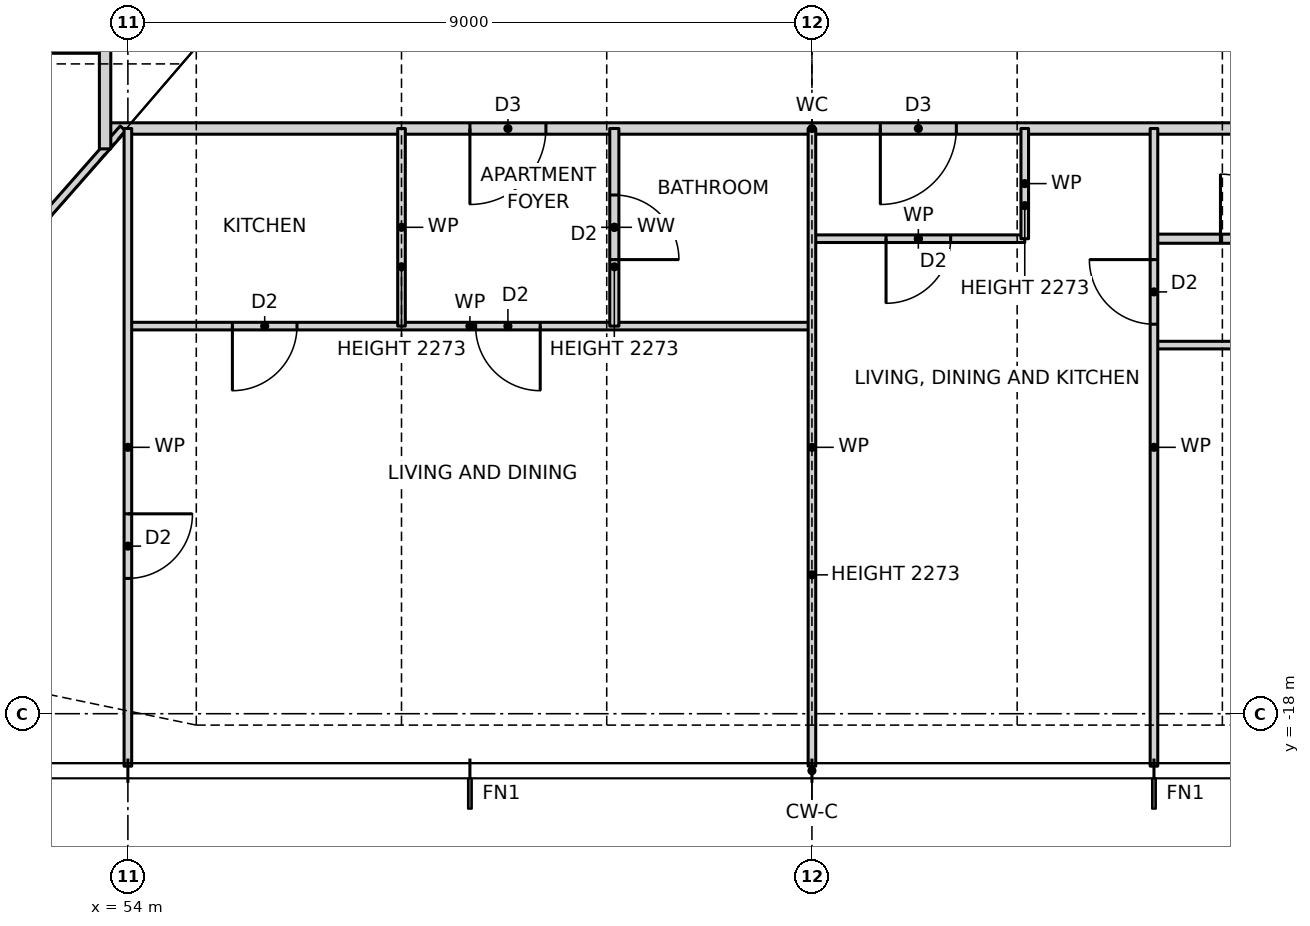
"""IFC4 building model, lengths in metres.
Left out: names, types, materials, properties, quantities, classifications, styles, units other than length and angle.
Written with IfcOpenShell. Run it as: python <this file> out.ifc"""

import sys

from ifc_helpers import new_model, si_unit, direction, frame, frame_2d, origin, place, context, subcontext, project, spatial, rectangle, extrude, element, fill, save


model = new_model("IFC4")
c1 = context("Model", 3, precision=1e-05, world=origin(), true_north=direction((0.0, 1.0)))
c2 = subcontext(c1, "Body", "Model", "MODEL_VIEW")
j1 = project(units=[si_unit("LENGTHUNIT", "METRE"), si_unit("PLANEANGLEUNIT", "RADIAN")], contexts=[c1])
p1 = place(None, origin())
s1 = spatial("IfcSite", under=j1, at=p1, CompositionType="ELEMENT")
p2 = place(p1, origin())
s2 = spatial("IfcBuilding", under=s1, at=p2, CompositionType="ELEMENT")
p3 = place(p2, frame((0.0, 0.0, 71.0)))
s3 = spatial("IfcBuildingStorey", under=s2, at=p3, CompositionType="ELEMENT", Elevation=71.0)
p4 = place(p3, frame((67.5, -13.15, 0.0), z_axis=(0.0, 0.0, 1.0), x_axis=(1.0, 0.0, 0.0)))
e1 = element("IfcWall", 1, at=p4, inside=s3, PredefinedType="PARTITIONING", context=c2, shape_type="SweptSolid", body=[
    extrude(rectangle(XDim=6.7, YDim=0.1, at=frame_2d((3.35, 0.0))), origin(), (0.0, 0.0, 1.0), 3.2),
])
p5 = place(p4, frame((1.825, 0.0, 0.0)))
e2 = element("IfcOpeningElement", 2, at=p5, cuts=e1, PredefinedType="OPENING", context=c2, shape_type="SweptSolid", body=[
    extrude(rectangle(XDim=0.85, YDim=2.1, at=frame_2d((0.425, 1.05))), frame((0.0, 0.06, 0.0), z_axis=(0.0, -1.0, 0.0), x_axis=(1.0, 0.0, 0.0)), (0.0, 0.0, 1.0), 0.12),
])
p6 = place(p4, frame((5.175, 0.0, 0.0)))
e3 = element("IfcOpeningElement", 3, at=p6, cuts=e1, PredefinedType="OPENING", context=c2, shape_type="SweptSolid", body=[
    extrude(rectangle(XDim=0.85, YDim=2.1, at=frame_2d((0.425, 1.05))), frame((0.0, 0.06, 0.0), z_axis=(0.0, -1.0, 0.0), x_axis=(1.0, 0.0, 0.0)), (0.0, 0.0, 1.0), 0.12),
])
p7 = place(p3, frame((54.0, -12.9, 0.0), z_axis=(0.0, 0.0, 1.0), x_axis=(1.0, 0.0, 0.0)))
e4 = element("IfcWall", 4, at=p7, inside=s3, PredefinedType="PARTITIONING", context=c2, shape_type="SweptSolid", body=[
    extrude(rectangle(XDim=9.0, YDim=0.1, at=frame_2d((4.5, 0.0))), origin(), (0.0, 0.0, 1.0), 3.2),
])
p8 = place(p7, frame((1.375, 0.0, 0.0)))
e5 = element("IfcOpeningElement", 5, at=p8, cuts=e4, PredefinedType="OPENING", context=c2, shape_type="SweptSolid", body=[
    extrude(rectangle(XDim=0.85, YDim=2.1, at=frame_2d((0.425, 1.05))), frame((0.0, 0.06, 0.0), z_axis=(0.0, -1.0, 0.0), x_axis=(1.0, 0.0, 0.0)), (0.0, 0.0, 1.0), 0.12),
])
p9 = place(p7, frame((4.575, 0.0, 0.0)))
e6 = element("IfcOpeningElement", 6, at=p9, cuts=e4, PredefinedType="OPENING", context=c2, shape_type="SweptSolid", body=[
    extrude(rectangle(XDim=0.85, YDim=2.1, at=frame_2d((0.425, 1.05))), frame((0.0, 0.06, 0.0), z_axis=(0.0, -1.0, 0.0), x_axis=(1.0, 0.0, 0.0)), (0.0, 0.0, 1.0), 0.12),
])
p10 = place(p3, frame((63.0, -11.75, 0.0), z_axis=(0.0, 0.0, 1.0), x_axis=(1.0, 0.0, 0.0)))
e7 = element("IfcWall", 7, at=p10, inside=s3, PredefinedType="PARTITIONING", context=c2, shape_type="SweptSolid", body=[
    extrude(rectangle(XDim=2.8, YDim=0.1, at=frame_2d((1.4, 0.0))), origin(), (0.0, 0.0, 1.0), 3.2),
])
p11 = place(p10, frame((0.975, 0.0, 0.0)))
e8 = element("IfcOpeningElement", 8, at=p11, cuts=e7, PredefinedType="OPENING", context=c2, shape_type="SweptSolid", body=[
    extrude(rectangle(XDim=0.85, YDim=2.1, at=frame_2d((0.425, 1.05))), frame((0.0, 0.06, 0.0), z_axis=(0.0, -1.0, 0.0), x_axis=(1.0, 0.0, 0.0)), (0.0, 0.0, 1.0), 0.12),
])
p12 = place(p3, frame((67.5, -11.75, 0.0), z_axis=(0.0, 0.0, 1.0), x_axis=(1.0, 0.0, 0.0)))
e9 = element("IfcWall", 9, at=p12, inside=s3, PredefinedType="PARTITIONING", context=c2, shape_type="SweptSolid", body=[
    extrude(rectangle(XDim=5.84, YDim=0.12, at=frame_2d((2.92, 0.0))), origin(), (0.0, 0.0, 1.0), 3.2),
])
p13 = place(p12, frame((0.875, 0.0, 0.0)))
e10 = element("IfcOpeningElement", 10, at=p13, cuts=e9, PredefinedType="OPENING", context=c2, shape_type="SweptSolid", body=[
    extrude(rectangle(XDim=0.85, YDim=2.1, at=frame_2d((0.425, 1.05))), frame((0.0, 0.07, 0.0), z_axis=(0.0, -1.0, 0.0), x_axis=(1.0, 0.0, 0.0)), (0.0, 0.0, 1.0), 0.14),
])
p14 = place(p12, frame((3.795, 0.0, 0.0)))
e11 = element("IfcOpeningElement", 11, at=p14, cuts=e9, PredefinedType="OPENING", context=c2, shape_type="SweptSolid", body=[
    extrude(rectangle(XDim=0.85, YDim=2.1, at=frame_2d((0.425, 1.05))), frame((0.0, 0.07, 0.0), z_axis=(0.0, -1.0, 0.0), x_axis=(1.0, 0.0, 0.0)), (0.0, 0.0, 1.0), 0.14),
])
p15 = place(p3, frame((53.7, -10.3, 0.0), z_axis=(0.0, 0.0, 1.0), x_axis=(1.0, 0.0, 0.0)))
e12 = element("IfcWall", 12, at=p15, inside=s3, PredefinedType="PARTITIONING", context=c2, shape_type="SweptSolid", body=[
    extrude(rectangle(XDim=18.6, YDim=0.15, at=frame_2d((9.3, 0.0))), origin(), (0.0, 0.0, 1.0), 3.2),
])
p16 = place(p15, frame((4.8, 0.0, 0.0)))
e13 = element("IfcOpeningElement", 13, at=p16, cuts=e12, PredefinedType="OPENING", context=c2, shape_type="SweptSolid", body=[
    extrude(rectangle(XDim=1.0, YDim=2.1, at=frame_2d((0.5, 1.05))), frame((0.0, 0.085, 0.0), z_axis=(0.0, -1.0, 0.0), x_axis=(1.0, 0.0, 0.0)), (0.0, 0.0, 1.0), 0.17),
])
p17 = place(p15, frame((10.2, 0.0, 0.0)))
e14 = element("IfcOpeningElement", 14, at=p17, cuts=e12, PredefinedType="OPENING", context=c2, shape_type="SweptSolid", body=[
    extrude(rectangle(XDim=1.0, YDim=2.1, at=frame_2d((0.5, 1.05))), frame((0.0, 0.085, 0.0), z_axis=(0.0, -1.0, 0.0), x_axis=(1.0, 0.0, 0.0)), (0.0, 0.0, 1.0), 0.17),
])
p18 = place(p3, frame((51.9, -9.25, 0.0), z_axis=(0.0, 0.0, 1.0), x_axis=(1.0, 0.0, 0.0)))
e15 = element("IfcWall", 15, at=p18, inside=s3, PredefinedType="PARTITIONING", context=c2, shape_type="SweptSolid", body=[
    extrude(rectangle(XDim=1.8, YDim=0.12, at=frame_2d((0.9, 0.0))), origin(), (0.0, 0.0, 1.0), 3.2),
])
p19 = place(p3, frame((47.944, -17.109, 0.0), z_axis=(0.0, 0.0, 1.0), x_axis=(0.660638210404, 0.750704439146, 0.0)))
e16 = element("IfcWall", 16, at=p19, inside=s3, PredefinedType="PARTITIONING", context=c2, shape_type="SweptSolid", body=[
    extrude(rectangle(XDim=9.07, YDim=0.1, at=frame_2d((4.535, 0.0))), origin(), (0.0, 0.0, 1.0), 2.273),
])
p20 = place(p3, frame((67.5, -18.69, 0.0), z_axis=(0.0, 0.0, 1.0), x_axis=(0.0, 1.0, 0.0)))
e17 = element("IfcWall", 17, at=p20, inside=s3, PredefinedType="PARTITIONING", context=c2, shape_type="SweptSolid", body=[
    extrude(rectangle(XDim=8.39, YDim=0.1, at=frame_2d((4.195, 0.0))), origin(), (0.0, 0.0, 1.0), 3.2),
])
p21 = place(p20, frame((5.815, 0.0, 0.0)))
e18 = element("IfcOpeningElement", 18, at=p21, cuts=e17, PredefinedType="OPENING", context=c2, shape_type="SweptSolid", body=[
    extrude(rectangle(XDim=0.85, YDim=2.1, at=frame_2d((0.425, 1.05))), frame((0.0, 0.06, 0.0), z_axis=(0.0, -1.0, 0.0), x_axis=(1.0, 0.0, 0.0)), (0.0, 0.0, 1.0), 0.12),
])
p22 = place(p3, frame((65.8, -11.75, 0.0), z_axis=(0.0, 0.0, 1.0), x_axis=(0.0, 1.0, 0.0)))
e19 = element("IfcWall", 19, at=p22, inside=s3, PredefinedType="PARTITIONING", context=c2, shape_type="SweptSolid", body=[
    extrude(rectangle(XDim=1.45, YDim=0.1, at=frame_2d((0.725, 0.0))), origin(), (0.0, 0.0, 1.0), 2.273),
])
p23 = place(p3, frame((63.0, -18.69, 0.0), z_axis=(0.0, 0.0, 1.0), x_axis=(0.0, 1.0, 0.0)))
e20 = element("IfcWall", 20, at=p23, inside=s3, PredefinedType="PARTITIONING", context=c2, shape_type="SweptSolid", body=[
    extrude(rectangle(XDim=8.39, YDim=0.1, at=frame_2d((4.195, 0.0))), origin(), (0.0, 0.0, 1.0), 2.273),
])
p24 = place(p3, frame((60.4, -12.9, 0.0), z_axis=(0.0, 0.0, 1.0), x_axis=(0.0, 1.0, 0.0)))
e21 = element("IfcWall", 21, at=p24, inside=s3, PredefinedType="PARTITIONING", context=c2, shape_type="SweptSolid", body=[
    extrude(rectangle(XDim=2.6, YDim=0.12, at=frame_2d((1.3, 0.0))), origin(), (0.0, 0.0, 1.0), 2.273),
])
p25 = place(p24, frame((0.875, 0.0, 0.0)))
e22 = element("IfcOpeningElement", 22, at=p25, cuts=e21, PredefinedType="OPENING", context=c2, shape_type="SweptSolid", body=[
    extrude(rectangle(XDim=0.85, YDim=2.1, at=frame_2d((0.425, 1.05))), frame((0.0, 0.07, 0.0), z_axis=(0.0, -1.0, 0.0), x_axis=(1.0, 0.0, 0.0)), (0.0, 0.0, 1.0), 0.14),
])
p26 = place(p3, frame((57.6, -12.9, 0.0), z_axis=(0.0, 0.0, 1.0), x_axis=(0.0, 1.0, 0.0)))
e23 = element("IfcWall", 23, at=p26, inside=s3, PredefinedType="PARTITIONING", context=c2, shape_type="SweptSolid", body=[
    extrude(rectangle(XDim=2.6, YDim=0.1, at=frame_2d((1.3, 0.0))), origin(), (0.0, 0.0, 1.0), 2.273),
])
p27 = place(p3, frame((54.0, -18.69, 0.0), z_axis=(0.0, 0.0, 1.0), x_axis=(0.0, 1.0, 0.0)))
e24 = element("IfcWall", 24, at=p27, inside=s3, PredefinedType="PARTITIONING", context=c2, shape_type="SweptSolid", body=[
    extrude(rectangle(XDim=8.39, YDim=0.1, at=frame_2d((4.195, 0.0))), origin(), (0.0, 0.0, 1.0), 3.2),
])
p28 = place(p27, frame((2.47, 0.0, 0.0)))
e25 = element("IfcOpeningElement", 25, at=p28, cuts=e24, PredefinedType="OPENING", context=c2, shape_type="SweptSolid", body=[
    extrude(rectangle(XDim=0.85, YDim=2.1, at=frame_2d((0.425, 1.05))), frame((0.0, 0.06, 0.0), z_axis=(0.0, -1.0, 0.0), x_axis=(1.0, 0.0, 0.0)), (0.0, 0.0, 1.0), 0.12),
])
p29 = place(p3, frame((53.7, -10.568, 0.0), z_axis=(0.0, 0.0, 1.0), x_axis=(0.0, 1.0, 0.0)))
e26 = element("IfcWall", 26, at=p29, inside=s3, PredefinedType="PARTITIONING", context=c2, shape_type="SweptSolid", body=[
    extrude(rectangle(XDim=21.136, YDim=0.15, at=frame_2d((10.568, 0.0))), origin(), (0.0, 0.0, 1.0), 3.2),
])
p30 = place(p29, frame((16.318, 0.0, 0.0)))
e27 = element("IfcOpeningElement", 27, at=p30, cuts=e26, PredefinedType="OPENING", context=c2, shape_type="SweptSolid", body=[
    extrude(rectangle(XDim=1.0, YDim=2.1, at=frame_2d((0.5, 1.05))), frame((0.0, 0.085, 0.0), z_axis=(0.0, -1.0, 0.0), x_axis=(1.0, 0.0, 0.0)), (0.0, 0.0, 1.0), 0.17),
])
p31 = place(p29, frame((10.918, 0.0, 0.0)))
e28 = element("IfcOpeningElement", 28, at=p31, cuts=e26, PredefinedType="OPENING", context=c2, shape_type="SweptSolid", body=[
    extrude(rectangle(XDim=1.0, YDim=2.1, at=frame_2d((0.5, 1.05))), frame((0.0, 0.085, 0.0), z_axis=(0.0, -1.0, 0.0), x_axis=(1.0, 0.0, 0.0)), (0.0, 0.0, 1.0), 0.17),
])
p32 = place(p8, frame((0.85, 0.0, 0.0), z_axis=(0.0, 0.0, 1.0), x_axis=(-1.0, 0.0, 0.0)))
e29 = element("IfcDoor", 29, at=p32, inside=s3, OperationType="SINGLE_SWING_RIGHT", PredefinedType="DOOR", context=c2, shape_type="SweptSolid", body=[
    extrude(rectangle(XDim=0.85, YDim=2.1, at=frame_2d((0.425, 1.05))), frame((0.0, 0.025, 0.0), z_axis=(0.0, -1.0, 0.0), x_axis=(1.0, 0.0, 0.0)), (0.0, 0.0, 1.0), 0.05),
])
fill(e5, e29)
p33 = place(p16, frame((1.0, 0.0, 0.0), z_axis=(0.0, 0.0, 1.0), x_axis=(-1.0, 0.0, 0.0)))
e30 = element("IfcDoor", 30, at=p33, inside=s3, OperationType="SINGLE_SWING_RIGHT", PredefinedType="DOOR", context=c2, shape_type="SweptSolid", body=[
    extrude(rectangle(XDim=1.0, YDim=2.1, at=frame_2d((0.5, 1.05))), frame((0.0, 0.025, 0.0), z_axis=(0.0, -1.0, 0.0), x_axis=(1.0, 0.0, 0.0)), (0.0, 0.0, 1.0), 0.05),
])
fill(e13, e30)
p34 = place(p9, frame((0.85, 0.0, 0.0), z_axis=(0.0, 0.0, 1.0), x_axis=(-1.0, 0.0, 0.0)))
e31 = element("IfcDoor", 31, at=p34, inside=s3, OperationType="SINGLE_SWING_LEFT", PredefinedType="DOOR", context=c2, shape_type="SweptSolid", body=[
    extrude(rectangle(XDim=0.85, YDim=2.1, at=frame_2d((0.425, 1.05))), frame((0.0, 0.025, 0.0), z_axis=(0.0, -1.0, 0.0), x_axis=(1.0, 0.0, 0.0)), (0.0, 0.0, 1.0), 0.05),
])
fill(e6, e31)
p35 = place(p25, frame((0.85, 0.0, 0.0), z_axis=(0.0, 0.0, 1.0), x_axis=(-1.0, 0.0, 0.0)))
e32 = element("IfcDoor", 32, at=p35, inside=s3, OperationType="SINGLE_SWING_RIGHT", PredefinedType="DOOR", context=c2, shape_type="SweptSolid", body=[
    extrude(rectangle(XDim=0.85, YDim=2.1, at=frame_2d((0.425, 1.05))), frame((0.0, 0.025, 0.0), z_axis=(0.0, -1.0, 0.0), x_axis=(1.0, 0.0, 0.0)), (0.0, 0.0, 1.0), 0.05),
])
fill(e22, e32)
p36 = place(p28, frame((0.85, 0.0, 0.0), z_axis=(0.0, 0.0, 1.0), x_axis=(-1.0, 0.0, 0.0)))
e33 = element("IfcDoor", 33, at=p36, inside=s3, OperationType="SINGLE_SWING_LEFT", PredefinedType="DOOR", context=c2, shape_type="SweptSolid", body=[
    extrude(rectangle(XDim=0.85, YDim=2.1, at=frame_2d((0.425, 1.05))), frame((0.0, 0.025, 0.0), z_axis=(0.0, -1.0, 0.0), x_axis=(1.0, 0.0, 0.0)), (0.0, 0.0, 1.0), 0.05),
])
fill(e25, e33)
p37 = place(p17, frame((1.0, 0.0, 0.0), z_axis=(0.0, 0.0, 1.0), x_axis=(-1.0, 0.0, 0.0)))
e34 = element("IfcDoor", 34, at=p37, inside=s3, OperationType="SINGLE_SWING_RIGHT", PredefinedType="DOOR", context=c2, shape_type="SweptSolid", body=[
    extrude(rectangle(XDim=1.0, YDim=2.1, at=frame_2d((0.5, 1.05))), frame((0.0, 0.025, 0.0), z_axis=(0.0, -1.0, 0.0), x_axis=(1.0, 0.0, 0.0)), (0.0, 0.0, 1.0), 0.05),
])
fill(e14, e34)
p38 = place(p11, frame((0.85, 0.0, 0.0), z_axis=(0.0, 0.0, 1.0), x_axis=(-1.0, 0.0, 0.0)))
e35 = element("IfcDoor", 35, at=p38, inside=s3, OperationType="SINGLE_SWING_RIGHT", PredefinedType="DOOR", context=c2, shape_type="SweptSolid", body=[
    extrude(rectangle(XDim=0.85, YDim=2.1, at=frame_2d((0.425, 1.05))), frame((0.0, 0.025, 0.0), z_axis=(0.0, -1.0, 0.0), x_axis=(1.0, 0.0, 0.0)), (0.0, 0.0, 1.0), 0.05),
])
fill(e8, e35)
p39 = place(p21, origin())
e36 = element("IfcDoor", 36, at=p39, inside=s3, OperationType="SINGLE_SWING_RIGHT", PredefinedType="DOOR", context=c2, shape_type="SweptSolid", body=[
    extrude(rectangle(XDim=0.85, YDim=2.1, at=frame_2d((0.425, 1.05))), frame((0.0, 0.025, 0.0), z_axis=(0.0, -1.0, 0.0), x_axis=(1.0, 0.0, 0.0)), (0.0, 0.0, 1.0), 0.05),
])
fill(e18, e36)
p40 = place(p13, origin())
e37 = element("IfcDoor", 37, at=p40, inside=s3, OperationType="SINGLE_SWING_LEFT", PredefinedType="DOOR", context=c2, shape_type="SweptSolid", body=[
    extrude(rectangle(XDim=0.85, YDim=2.1, at=frame_2d((0.425, 1.05))), frame((0.0, 0.025, 0.0), z_axis=(0.0, -1.0, 0.0), x_axis=(1.0, 0.0, 0.0)), (0.0, 0.0, 1.0), 0.05),
])
fill(e10, e37)
save(model, sys.argv[1])
